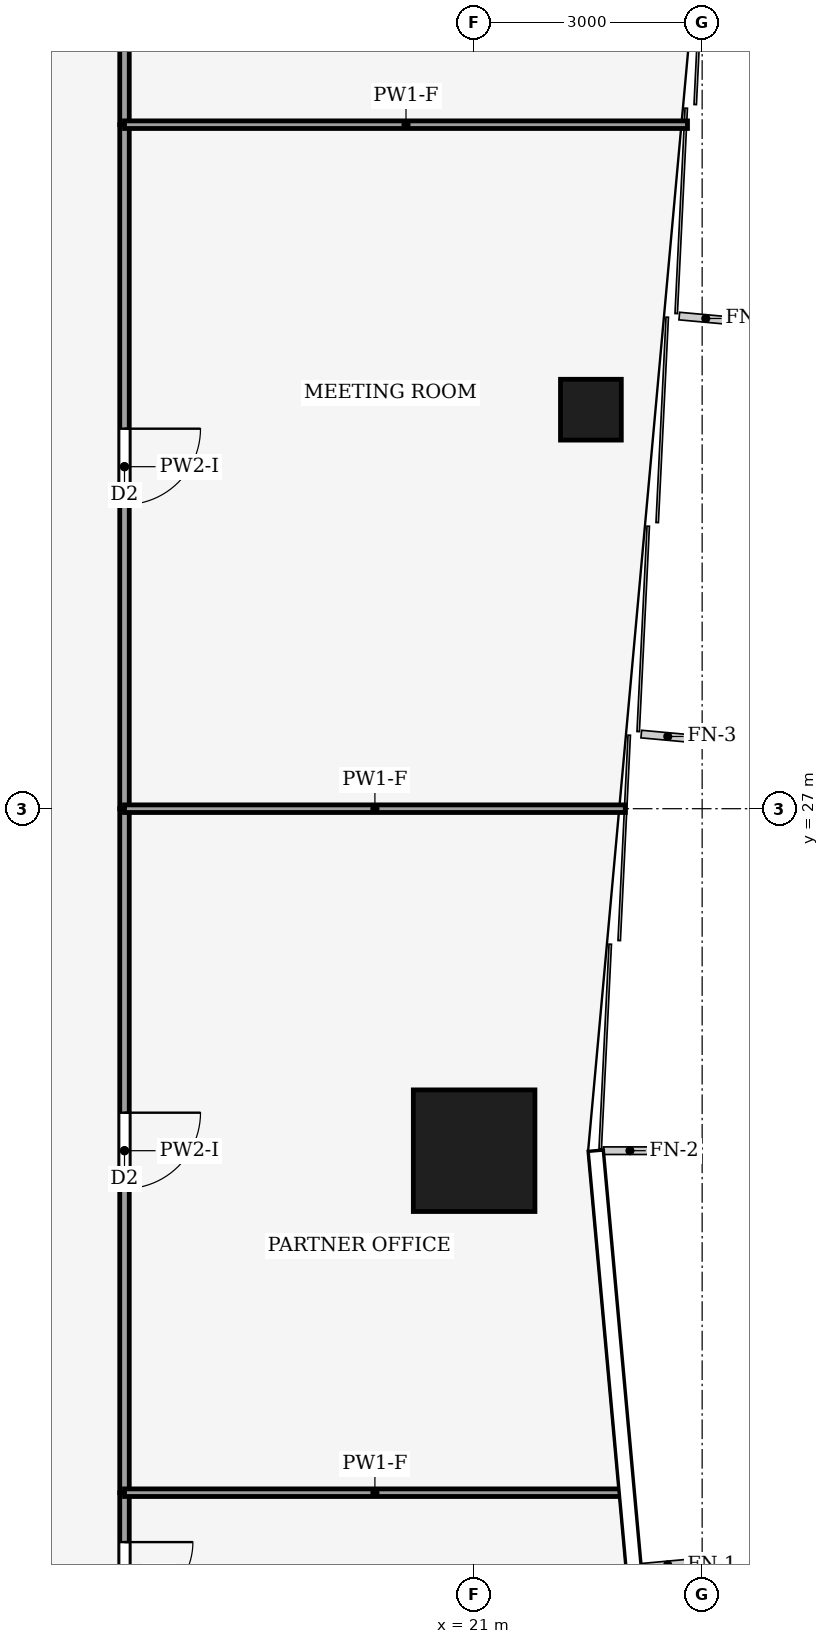
"""IFC4 building model, lengths in metres.
Left out: names, types, materials, properties, quantities, classifications, styles, units other than length and angle.
Written with IfcOpenShell. Run it as: python <this file> out.ifc"""

import sys

from ifc_helpers import new_model, si_unit, direction, frame, frame_2d, origin, origin_2d, place, context, subcontext, project, spatial, rectangle, hollow_rectangle, extrude, element, fill, save


model = new_model("IFC4")
c1 = context("Model", 3, precision=1e-05, world=origin(), true_north=direction((0.0, 1.0)))
c2 = subcontext(c1, "Body", "Model", "MODEL_VIEW")
j1 = project(units=[si_unit("LENGTHUNIT", "METRE"), si_unit("PLANEANGLEUNIT", "RADIAN")], contexts=[c1])
p1 = place(None, origin())
s1 = spatial("IfcSite", under=j1, at=p1, CompositionType="ELEMENT")
p2 = place(p1, origin())
s2 = spatial("IfcBuilding", under=s1, at=p2, CompositionType="ELEMENT")
p3 = place(p2, frame((0.0, 0.0, 50.0)))
s3 = spatial("IfcBuildingStorey", under=s2, at=p3, CompositionType="ELEMENT", Elevation=50.0)
p4 = place(p3, frame((21.0, 22.5, 0.0), z_axis=(0.0, 0.0, 1.0), x_axis=(1.0, 0.0, 0.0)))
e1 = element("IfcColumn", 1, at=p4, inside=s3, PredefinedType="COLUMN", context=c2, shape_type="SweptSolid", body=[
    extrude(hollow_rectangle(XDim=1.6, YDim=1.6, WallThickness=0.09, at=origin_2d()), origin(), (0.0, 0.0, 1.0), 4.0),
])
p5 = place(p3, frame((22.536, 32.25, 0.0), z_axis=(0.0, 0.0, 1.0), x_axis=(1.0, 0.0, 0.0)))
e2 = element("IfcColumn", 2, at=p5, inside=s3, PredefinedType="COLUMN", context=c2, shape_type="SweptSolid", body=[
    extrude(hollow_rectangle(XDim=0.8, YDim=0.8, WallThickness=0.04, at=origin_2d()), origin(), (0.0, 0.0, 1.0), 4.0),
])
p6 = place(p3, frame((16.4, 18.0, 0.0), z_axis=(0.0, 0.0, 1.0), x_axis=(0.0, -1.0, 0.0)))
e3 = element("IfcWall", 3, at=p6, inside=s3, PredefinedType="PARTITIONING", context=c2, shape_type="SweptSolid", body=[
    extrude(rectangle(XDim=3.0, YDim=0.125, at=frame_2d((1.5, 0.0))), origin(), (0.0, 0.0, 1.0), 3.14),
])
p7 = place(p6, frame((0.65, 0.0, 0.0)))
e4 = element("IfcOpeningElement", 4, at=p7, cuts=e3, PredefinedType="OPENING", context=c2, shape_type="SweptSolid", body=[
    extrude(rectangle(XDim=0.9, YDim=2.1, at=frame_2d((0.45, 1.05))), frame((0.0, 0.073, 0.0), z_axis=(0.0, -1.0, 0.0), x_axis=(1.0, 0.0, 0.0)), (0.0, 0.0, 1.0), 0.145),
])
p8 = place(p3, frame((16.4, 27.0, 0.0), z_axis=(0.0, 0.0, 1.0), x_axis=(0.0, -1.0, 0.0)))
e5 = element("IfcWall", 5, at=p8, inside=s3, PredefinedType="PARTITIONING", context=c2, shape_type="SweptSolid", body=[
    extrude(rectangle(XDim=9.0, YDim=0.125, at=frame_2d((4.5, 0.0))), origin(), (0.0, 0.0, 1.0), 3.48),
])
p9 = place(p8, frame((4.0, 0.0, 0.0)))
e6 = element("IfcOpeningElement", 6, at=p9, cuts=e5, PredefinedType="OPENING", context=c2, shape_type="SweptSolid", body=[
    extrude(rectangle(XDim=1.0, YDim=2.1, at=frame_2d((0.5, 1.05))), frame((0.0, 0.073, 0.0), z_axis=(0.0, -1.0, 0.0), x_axis=(1.0, 0.0, 0.0)), (0.0, 0.0, 1.0), 0.145),
])
p10 = place(p3, frame((16.4, 36.0, 0.0), z_axis=(0.0, 0.0, 1.0), x_axis=(0.0, -1.0, 0.0)))
e7 = element("IfcWall", 7, at=p10, inside=s3, PredefinedType="PARTITIONING", context=c2, shape_type="SweptSolid", body=[
    extrude(rectangle(XDim=9.0, YDim=0.125, at=frame_2d((4.5, 0.0))), origin(), (0.0, 0.0, 1.0), 3.48),
])
p11 = place(p10, frame((4.0, 0.0, 0.0)))
e8 = element("IfcOpeningElement", 8, at=p11, cuts=e7, PredefinedType="OPENING", context=c2, shape_type="SweptSolid", body=[
    extrude(rectangle(XDim=1.0, YDim=2.1, at=frame_2d((0.5, 1.05))), frame((0.0, 0.073, 0.0), z_axis=(0.0, -1.0, 0.0), x_axis=(1.0, 0.0, 0.0)), (0.0, 0.0, 1.0), 0.145),
])
p12 = place(p3, frame((16.4, 41.404, 0.0), z_axis=(0.0, 0.0, 1.0), x_axis=(0.0, -1.0, 0.0)))
e9 = element("IfcWall", 9, at=p12, inside=s3, PredefinedType="PARTITIONING", context=c2, shape_type="SweptSolid", body=[
    extrude(rectangle(XDim=5.404, YDim=0.125, at=frame_2d((2.702, 0.0))), origin(), (0.0, 0.0, 1.0), 3.14),
])
p13 = place(p12, frame((2.202, 0.0, 0.0)))
e10 = element("IfcOpeningElement", 10, at=p13, cuts=e9, PredefinedType="OPENING", context=c2, shape_type="SweptSolid", body=[
    extrude(rectangle(XDim=1.0, YDim=2.1, at=frame_2d((0.5, 1.05))), frame((0.0, 0.073, 0.0), z_axis=(0.0, -1.0, 0.0), x_axis=(1.0, 0.0, 0.0)), (0.0, 0.0, 1.0), 0.145),
])
for number, where, z_axis, x_axis in (
    (11, (22.989, 18.0, 0.0), (0.0, 0.0, 1.0), (-1.0, 0.0, 0.0)),
    (12, (22.989, 27.0, 0.0), (0.0, 0.0, 1.0), (-1.0, 0.0, 0.0)),
):
    element("IfcWall", number, at=place(p3, frame(where, z_axis=z_axis, x_axis=x_axis)), inside=s3, PredefinedType="PARTITIONING", context=c2, shape_type="SweptSolid", body=[
        extrude(rectangle(XDim=6.589, YDim=0.1, at=frame_2d((3.294, 0.0))), origin(), (0.0, 0.0, 1.0), 3.04),
    ])
p14 = place(p3, frame((23.807, 36.0, 0.0), z_axis=(0.0, 0.0, 1.0), x_axis=(-1.0, 0.0, 0.0)))
e13 = element("IfcWall", 13, at=p14, inside=s3, PredefinedType="PARTITIONING", context=c2, shape_type="SweptSolid", body=[
    extrude(rectangle(XDim=7.407, YDim=0.1, at=frame_2d((3.704, 0.0))), origin(), (0.0, 0.0, 1.0), 3.04),
])
p15 = place(p7, origin())
e14 = element("IfcDoor", 14, at=p15, inside=s3, OperationType="SINGLE_SWING_LEFT", PredefinedType="DOOR", context=c2, shape_type="SweptSolid", body=[
    extrude(rectangle(XDim=0.9, YDim=2.1, at=frame_2d((0.45, 1.05))), frame((0.0, 0.025, 0.0), z_axis=(0.0, -1.0, 0.0), x_axis=(1.0, 0.0, 0.0)), (0.0, 0.0, 1.0), 0.05),
])
fill(e4, e14)
p16 = place(p9, origin())
e15 = element("IfcDoor", 15, at=p16, inside=s3, OperationType="SINGLE_SWING_RIGHT", PredefinedType="DOOR", context=c2, shape_type="SweptSolid", body=[
    extrude(rectangle(XDim=1.0, YDim=2.1, at=frame_2d((0.5, 1.05))), frame((0.0, 0.025, 0.0), z_axis=(0.0, -1.0, 0.0), x_axis=(1.0, 0.0, 0.0)), (0.0, 0.0, 1.0), 0.05),
])
fill(e6, e15)
p17 = place(p11, origin())
e16 = element("IfcDoor", 16, at=p17, inside=s3, OperationType="SINGLE_SWING_LEFT", PredefinedType="DOOR", context=c2, shape_type="SweptSolid", body=[
    extrude(rectangle(XDim=1.0, YDim=2.1, at=frame_2d((0.5, 1.05))), frame((0.0, 0.025, 0.0), z_axis=(0.0, -1.0, 0.0), x_axis=(1.0, 0.0, 0.0)), (0.0, 0.0, 1.0), 0.05),
])
fill(e8, e16)
save(model, sys.argv[1])
